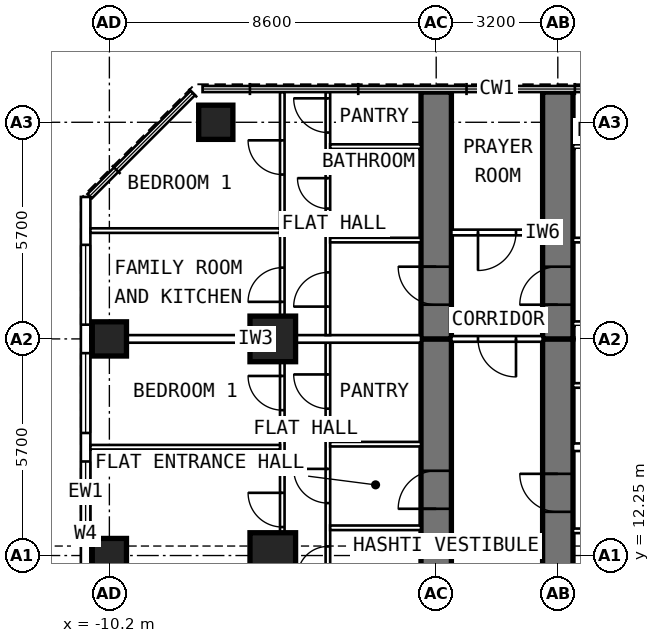
"""IFC4 building model, lengths in metres.
Left out: names, types, materials, properties, quantities, classifications, styles, units other than length and angle.
Written with IfcOpenShell. Run it as: python <this file> out.ifc"""

import sys

from ifc_helpers import new_model, si_unit, direction, frame, frame_2d, origin, origin_2d, place, context, subcontext, project, spatial, rectangle, extrude, element, fill, save


model = new_model("IFC4")
c1 = context("Model", 3, precision=1e-05, world=origin(), true_north=direction((0.0, 1.0)))
c2 = subcontext(c1, "Body", "Model", "MODEL_VIEW")
j1 = project(units=[si_unit("LENGTHUNIT", "METRE"), si_unit("PLANEANGLEUNIT", "RADIAN")], contexts=[c1])
p1 = place(None, origin())
s1 = spatial("IfcSite", under=j1, at=p1, CompositionType="ELEMENT")
p2 = place(p1, origin())
s2 = spatial("IfcBuilding", under=s1, at=p2, CompositionType="ELEMENT")
p3 = place(p2, frame((0.0, 0.0, 145.4)))
s3 = spatial("IfcBuildingStorey", under=s2, at=p3, CompositionType="ELEMENT", Elevation=145.4)
for number, where, z_axis, x_axis in (
    (1, (-10.2, 12.25, 0.0), (0.0, 0.0, 1.0), (0.0, 1.0, 0.0)),
    (2, (-10.2, 17.95, 0.0), (0.0, 0.0, 1.0), (0.0, 1.0, 0.0)),
    (3, (-7.4, 23.65, 0.0), (0.0, 0.0, 1.0), (0.0, 1.0, 0.0)),
):
    element("IfcColumn", number, at=place(p3, frame(where, z_axis=z_axis, x_axis=x_axis)), inside=s3, PredefinedType="COLUMN", context=c2, shape_type="SweptSolid", body=[
        extrude(rectangle(XDim=0.9, YDim=0.9, at=origin_2d()), origin(), (0.0, 0.0, 1.0), 3.6),
    ])
for number, where, z_axis, x_axis in (
    (4, (-5.9, 12.25, 0.0), (0.0, 0.0, 1.0), (0.0, 1.0, 0.0)),
    (5, (-5.9, 17.95, 0.0), (0.0, 0.0, 1.0), (0.0, 1.0, 0.0)),
):
    element("IfcColumn", number, at=place(p3, frame(where, z_axis=z_axis, x_axis=x_axis)), inside=s3, PredefinedType="COLUMN", context=c2, shape_type="SweptSolid", body=[
        extrude(rectangle(XDim=1.2, YDim=1.2, at=origin_2d()), origin(), (0.0, 0.0, 1.0), 3.6),
    ])
p4 = place(p3, frame((-1.6, 9.6, 0.0), z_axis=(0.0, 0.0, 1.0), x_axis=(0.0, 1.0, 0.0)))
e6 = element("IfcWall", 6, at=p4, inside=s3, PredefinedType="SHEAR", context=c2, shape_type="SweptSolid", body=[
    extrude(rectangle(XDim=8.35, YDim=0.8, at=frame_2d((4.175, 0.0))), origin(), (0.0, 0.0, 1.0), 3.6),
])
p5 = place(p4, frame((3.88, 0.0, 0.0)))
e7 = element("IfcOpeningElement", 7, at=p5, cuts=e6, PredefinedType="OPENING", context=c2, shape_type="SweptSolid", body=[
    extrude(rectangle(XDim=1.0, YDim=2.1, at=frame_2d((0.5, 1.05))), frame((0.0, 0.412, 0.0), z_axis=(0.0, -1.0, 0.0), x_axis=(1.0, 0.0, 0.0)), (0.0, 0.0, 1.0), 0.824),
])
p6 = place(p3, frame((-1.6, 17.95, 0.0), z_axis=(0.0, 0.0, 1.0), x_axis=(0.0, 1.0, 0.0)))
e8 = element("IfcWall", 8, at=p6, inside=s3, PredefinedType="SHEAR", context=c2, shape_type="SweptSolid", body=[
    extrude(rectangle(XDim=6.495, YDim=0.8, at=frame_2d((3.248, 0.0))), origin(), (0.0, 0.0, 1.0), 3.6),
])
p7 = place(p6, frame((0.9, 0.0, 0.0)))
e9 = element("IfcOpeningElement", 9, at=p7, cuts=e8, PredefinedType="OPENING", context=c2, shape_type="SweptSolid", body=[
    extrude(rectangle(XDim=1.0, YDim=2.1, at=frame_2d((0.5, 1.05))), frame((0.0, 0.412, 0.0), z_axis=(0.0, -1.0, 0.0), x_axis=(1.0, 0.0, 0.0)), (0.0, 0.0, 1.0), 0.824),
])
p8 = place(p3, frame((1.6, 9.6, 0.0), z_axis=(0.0, 0.0, 1.0), x_axis=(0.0, 1.0, 0.0)))
e10 = element("IfcWall", 10, at=p8, inside=s3, PredefinedType="SHEAR", context=c2, shape_type="SweptSolid", body=[
    extrude(rectangle(XDim=8.35, YDim=0.8, at=frame_2d((4.175, 0.0))), origin(), (0.0, 0.0, 1.0), 3.6),
])
p9 = place(p8, frame((3.8, 0.0, 0.0)))
e11 = element("IfcOpeningElement", 11, at=p9, cuts=e10, PredefinedType="OPENING", context=c2, shape_type="SweptSolid", body=[
    extrude(rectangle(XDim=1.0, YDim=2.1, at=frame_2d((0.5, 1.05))), frame((0.0, 0.412, 0.0), z_axis=(0.0, -1.0, 0.0), x_axis=(1.0, 0.0, 0.0)), (0.0, 0.0, 1.0), 0.824),
])
p10 = place(p3, frame((1.6, 17.95, 0.0), z_axis=(0.0, 0.0, 1.0), x_axis=(0.0, 1.0, 0.0)))
e12 = element("IfcWall", 12, at=p10, inside=s3, PredefinedType="SHEAR", context=c2, shape_type="SweptSolid", body=[
    extrude(rectangle(XDim=6.495, YDim=0.8, at=frame_2d((3.248, 0.0))), origin(), (0.0, 0.0, 1.0), 3.6),
])
p11 = place(p10, frame((0.9, 0.0, 0.0)))
e13 = element("IfcOpeningElement", 13, at=p11, cuts=e12, PredefinedType="OPENING", context=c2, shape_type="SweptSolid", body=[
    extrude(rectangle(XDim=1.0, YDim=2.1, at=frame_2d((0.5, 1.05))), frame((0.0, 0.412, 0.0), z_axis=(0.0, -1.0, 0.0), x_axis=(1.0, 0.0, 0.0)), (0.0, 0.0, 1.0), 0.824),
])
p12 = place(p3, frame((-10.825, 6.148, 0.0), z_axis=(0.0, 0.0, 1.0), x_axis=(0.0, 1.0, 0.0)))
e14 = element("IfcWall", 14, at=p12, inside=s3, PredefinedType="SOLIDWALL", context=c2, shape_type="SweptSolid", body=[
    extrude(rectangle(XDim=15.537, YDim=0.25, at=frame_2d((7.769, 0.0))), origin(), (0.0, 0.0, 1.0), 3.35),
])
p13 = place(p12, frame((0.777, 0.0, 0.8)))
e15 = element("IfcOpeningElement", 15, at=p13, cuts=e14, PredefinedType="OPENING", context=c2, shape_type="SweptSolid", body=[
    extrude(rectangle(XDim=2.1, YDim=1.8, at=frame_2d((1.05, 0.9))), frame((0.0, 0.137, 0.0), z_axis=(0.0, -1.0, 0.0), x_axis=(1.0, 0.0, 0.0)), (0.0, 0.0, 1.0), 0.274),
])
p14 = place(p12, frame((3.627, 0.0, 0.8)))
e16 = element("IfcOpeningElement", 16, at=p14, cuts=e14, PredefinedType="OPENING", context=c2, shape_type="SweptSolid", body=[
    extrude(rectangle(XDim=2.1, YDim=1.8, at=frame_2d((1.05, 0.9))), frame((0.0, 0.137, 0.0), z_axis=(0.0, -1.0, 0.0), x_axis=(1.0, 0.0, 0.0)), (0.0, 0.0, 1.0), 0.274),
])
p15 = place(p12, frame((6.477, 0.0, 0.8)))
e17 = element("IfcOpeningElement", 17, at=p15, cuts=e14, PredefinedType="OPENING", context=c2, shape_type="SweptSolid", body=[
    extrude(rectangle(XDim=2.1, YDim=1.8, at=frame_2d((1.05, 0.9))), frame((0.0, 0.137, 0.0), z_axis=(0.0, -1.0, 0.0), x_axis=(1.0, 0.0, 0.0)), (0.0, 0.0, 1.0), 0.274),
])
p16 = place(p12, frame((9.327, 0.0, 0.8)))
e18 = element("IfcOpeningElement", 18, at=p16, cuts=e14, PredefinedType="OPENING", context=c2, shape_type="SweptSolid", body=[
    extrude(rectangle(XDim=2.1, YDim=1.8, at=frame_2d((1.05, 0.9))), frame((0.0, 0.137, 0.0), z_axis=(0.0, -1.0, 0.0), x_axis=(1.0, 0.0, 0.0)), (0.0, 0.0, 1.0), 0.274),
])
p17 = place(p12, frame((12.177, 0.0, 0.8)))
e19 = element("IfcOpeningElement", 19, at=p17, cuts=e14, PredefinedType="OPENING", context=c2, shape_type="SweptSolid", body=[
    extrude(rectangle(XDim=2.1, YDim=1.8, at=frame_2d((1.05, 0.9))), frame((0.0, 0.137, 0.0), z_axis=(0.0, -1.0, 0.0), x_axis=(1.0, 0.0, 0.0)), (0.0, 0.0, 1.0), 0.274),
])
p18 = place(p3, frame((-4.45, 10.05, 0.0), z_axis=(0.0, 0.0, 1.0), x_axis=(0.0, 1.0, 0.0)))
e20 = element("IfcWall", 20, at=p18, inside=s3, PredefinedType="PARTITIONING", context=c2, shape_type="SweptSolid", body=[
    extrude(rectangle(XDim=7.8, YDim=0.12, at=frame_2d((3.9, 0.0))), origin(), (0.0, 0.0, 1.0), 3.35),
])
p19 = place(p18, frame((1.64, 0.0, 0.0)))
e21 = element("IfcOpeningElement", 21, at=p19, cuts=e20, PredefinedType="OPENING", context=c2, shape_type="SweptSolid", body=[
    extrude(rectangle(XDim=0.8, YDim=2.1, at=frame_2d((0.4, 1.05))), frame((0.0, 0.072, 0.0), z_axis=(0.0, -1.0, 0.0), x_axis=(1.0, 0.0, 0.0)), (0.0, 0.0, 1.0), 0.144),
])
p20 = place(p18, frame((3.58, 0.0, 0.0)))
e22 = element("IfcOpeningElement", 22, at=p20, cuts=e20, PredefinedType="OPENING", context=c2, shape_type="SweptSolid", body=[
    extrude(rectangle(XDim=0.9, YDim=2.1, at=frame_2d((0.45, 1.05))), frame((0.0, 0.072, 0.0), z_axis=(0.0, -1.0, 0.0), x_axis=(1.0, 0.0, 0.0)), (0.0, 0.0, 1.0), 0.144),
])
p21 = place(p18, frame((6.065, 0.0, 0.0)))
e23 = element("IfcOpeningElement", 23, at=p21, cuts=e20, PredefinedType="OPENING", context=c2, shape_type="SweptSolid", body=[
    extrude(rectangle(XDim=0.9, YDim=2.1, at=frame_2d((0.45, 1.05))), frame((0.0, 0.072, 0.0), z_axis=(0.0, -1.0, 0.0), x_axis=(1.0, 0.0, 0.0)), (0.0, 0.0, 1.0), 0.144),
])
p22 = place(p3, frame((-5.65, 9.6, 0.0), z_axis=(0.0, 0.0, 1.0), x_axis=(0.0, 1.0, 0.0)))
e24 = element("IfcWall", 24, at=p22, inside=s3, PredefinedType="PARTITIONING", context=c2, shape_type="SweptSolid", body=[
    extrude(rectangle(XDim=8.1, YDim=0.12, at=frame_2d((4.05, 0.0))), origin(), (0.0, 0.0, 1.0), 3.35),
])
p23 = place(p22, frame((3.4, 0.0, 0.0)))
e25 = element("IfcOpeningElement", 25, at=p23, cuts=e24, PredefinedType="OPENING", context=c2, shape_type="SweptSolid", body=[
    extrude(rectangle(XDim=0.9, YDim=2.1, at=frame_2d((0.45, 1.05))), frame((0.0, 0.072, 0.0), z_axis=(0.0, -1.0, 0.0), x_axis=(1.0, 0.0, 0.0)), (0.0, 0.0, 1.0), 0.144),
])
p24 = place(p22, frame((6.475, 0.0, 0.0)))
e26 = element("IfcOpeningElement", 26, at=p24, cuts=e24, PredefinedType="OPENING", context=c2, shape_type="SweptSolid", body=[
    extrude(rectangle(XDim=0.9, YDim=2.1, at=frame_2d((0.45, 1.05))), frame((0.0, 0.072, 0.0), z_axis=(0.0, -1.0, 0.0), x_axis=(1.0, 0.0, 0.0)), (0.0, 0.0, 1.0), 0.144),
])
p25 = place(p3, frame((-5.71, 15.1, 0.0), z_axis=(0.0, 0.0, 1.0), x_axis=(-1.0, 0.0, 0.0)))
e27 = element("IfcWall", 27, at=p25, inside=s3, PredefinedType="PARTITIONING", context=c2, shape_type="SweptSolid", body=[
    extrude(rectangle(XDim=4.99, YDim=0.12, at=frame_2d((2.495, 0.0))), origin(), (0.0, 0.0, 1.0), 3.35),
])
for number, where, z_axis, x_axis in (
    (28, (-2.0, 12.98, 0.0), (0.0, 0.0, 1.0), (-1.0, 0.0, 0.0)),
    (29, (-2.0, 15.18, 0.0), (0.0, 0.0, 1.0), (-1.0, 0.0, 0.0)),
):
    element("IfcWall", number, at=place(p3, frame(where, z_axis=z_axis, x_axis=x_axis)), inside=s3, PredefinedType="PARTITIONING", context=c2, shape_type="SweptSolid", body=[
        extrude(rectangle(XDim=2.39, YDim=0.12, at=frame_2d((1.195, 0.0))), origin(), (0.0, 0.0, 1.0), 3.35),
    ])
p26 = place(p3, frame((-4.45, 18.05, 0.0), z_axis=(0.0, 0.0, 1.0), x_axis=(0.0, 1.0, 0.0)))
e30 = element("IfcWall", 30, at=p26, inside=s3, PredefinedType="PARTITIONING", context=c2, shape_type="SweptSolid", body=[
    extrude(rectangle(XDim=6.395, YDim=0.12, at=frame_2d((3.198, 0.0))), origin(), (0.0, 0.0, 1.0), 3.35),
])
p27 = place(p26, frame((0.75, 0.0, 0.0)))
e31 = element("IfcOpeningElement", 31, at=p27, cuts=e30, PredefinedType="OPENING", context=c2, shape_type="SweptSolid", body=[
    extrude(rectangle(XDim=0.9, YDim=2.1, at=frame_2d((0.45, 1.05))), frame((0.0, 0.072, 0.0), z_axis=(0.0, -1.0, 0.0), x_axis=(1.0, 0.0, 0.0)), (0.0, 0.0, 1.0), 0.144),
])
p28 = place(p26, frame((3.33, 0.0, 0.0)))
e32 = element("IfcOpeningElement", 32, at=p28, cuts=e30, PredefinedType="OPENING", context=c2, shape_type="SweptSolid", body=[
    extrude(rectangle(XDim=0.8, YDim=2.1, at=frame_2d((0.4, 1.05))), frame((0.0, 0.072, 0.0), z_axis=(0.0, -1.0, 0.0), x_axis=(1.0, 0.0, 0.0)), (0.0, 0.0, 1.0), 0.144),
])
p29 = place(p26, frame((5.33, 0.0, 0.0)))
e33 = element("IfcOpeningElement", 33, at=p29, cuts=e30, PredefinedType="OPENING", context=c2, shape_type="SweptSolid", body=[
    extrude(rectangle(XDim=0.9, YDim=2.1, at=frame_2d((0.45, 1.05))), frame((0.0, 0.072, 0.0), z_axis=(0.0, -1.0, 0.0), x_axis=(1.0, 0.0, 0.0)), (0.0, 0.0, 1.0), 0.144),
])
p30 = place(p3, frame((-5.65, 18.05, 0.0), z_axis=(0.0, 0.0, 1.0), x_axis=(0.0, 1.0, 0.0)))
e34 = element("IfcWall", 34, at=p30, inside=s3, PredefinedType="PARTITIONING", context=c2, shape_type="SweptSolid", body=[
    extrude(rectangle(XDim=6.395, YDim=0.12, at=frame_2d((3.198, 0.0))), origin(), (0.0, 0.0, 1.0), 3.35),
])
p31 = place(p30, frame((0.875, 0.0, 0.0)))
e35 = element("IfcOpeningElement", 35, at=p31, cuts=e34, PredefinedType="OPENING", context=c2, shape_type="SweptSolid", body=[
    extrude(rectangle(XDim=0.9, YDim=2.1, at=frame_2d((0.45, 1.05))), frame((0.0, 0.072, 0.0), z_axis=(0.0, -1.0, 0.0), x_axis=(1.0, 0.0, 0.0)), (0.0, 0.0, 1.0), 0.144),
])
p32 = place(p30, frame((4.225, 0.0, 0.0)))
e36 = element("IfcOpeningElement", 36, at=p32, cuts=e34, PredefinedType="OPENING", context=c2, shape_type="SweptSolid", body=[
    extrude(rectangle(XDim=0.9, YDim=2.1, at=frame_2d((0.45, 1.05))), frame((0.0, 0.072, 0.0), z_axis=(0.0, -1.0, 0.0), x_axis=(1.0, 0.0, 0.0)), (0.0, 0.0, 1.0), 0.144),
])
p33 = place(p3, frame((-5.71, 20.8, 0.0), z_axis=(0.0, 0.0, 1.0), x_axis=(-1.0, 0.0, 0.0)))
e37 = element("IfcWall", 37, at=p33, inside=s3, PredefinedType="PARTITIONING", context=c2, shape_type="SweptSolid", body=[
    extrude(rectangle(XDim=4.99, YDim=0.12, at=frame_2d((2.495, 0.0))), origin(), (0.0, 0.0, 1.0), 3.35),
])
for number, where, z_axis, x_axis in (
    (38, (-2.0, 20.55, 0.0), (0.0, 0.0, 1.0), (-1.0, 0.0, 0.0)),
    (39, (-2.0, 23.01, 0.0), (0.0, 0.0, 1.0), (-1.0, 0.0, 0.0)),
):
    element("IfcWall", number, at=place(p3, frame(where, z_axis=z_axis, x_axis=x_axis)), inside=s3, PredefinedType="PARTITIONING", context=c2, shape_type="SweptSolid", body=[
        extrude(rectangle(XDim=2.39, YDim=0.12, at=frame_2d((1.195, 0.0))), origin(), (0.0, 0.0, 1.0), 3.35),
    ])
p34 = place(p3, frame((-2.0, 17.95, 0.0), z_axis=(0.0, 0.0, 1.0), x_axis=(-1.0, 0.0, 0.0)))
e40 = element("IfcWall", 40, at=p34, inside=s3, PredefinedType="PARTITIONING", context=c2, shape_type="SweptSolid", body=[
    extrude(rectangle(XDim=8.7, YDim=0.2, at=frame_2d((4.35, 0.0))), origin(), (0.0, 0.0, 1.0), 2.45),
])
for number, where, z_axis, x_axis in (
    (41, (2.0, 12.9, 0.0), (0.0, 0.0, 1.0), (1.0, 0.0, 0.0)),
    (42, (2.0, 16.725, 0.0), (0.0, 0.0, 1.0), (1.0, 0.0, 0.0)),
    (43, (2.0, 18.35, 0.0), (0.0, 0.0, 1.0), (1.0, 0.0, 0.0)),
    (44, (2.0, 20.55, 0.0), (0.0, 0.0, 1.0), (1.0, 0.0, 0.0)),
    (45, (2.0, 23.01, 0.0), (0.0, 0.0, 1.0), (1.0, 0.0, 0.0)),
):
    element("IfcWall", number, at=place(p3, frame(where, z_axis=z_axis, x_axis=x_axis)), inside=s3, PredefinedType="PARTITIONING", context=c2, shape_type="SweptSolid", body=[
        extrude(rectangle(XDim=2.39, YDim=0.12, at=frame_2d((1.195, 0.0))), origin(), (0.0, 0.0, 1.0), 3.35),
    ])
p35 = place(p3, frame((2.0, 15.1, 0.0), z_axis=(0.0, 0.0, 1.0), x_axis=(1.0, 0.0, 0.0)))
e46 = element("IfcWall", 46, at=p35, inside=s3, PredefinedType="PARTITIONING", context=c2, shape_type="SweptSolid", body=[
    extrude(rectangle(XDim=8.7, YDim=0.2, at=frame_2d((4.35, 0.0))), origin(), (0.0, 0.0, 1.0), 3.35),
])
p36 = place(p3, frame((1.2, 20.75, 0.0), z_axis=(0.0, 0.0, 1.0), x_axis=(-1.0, 0.0, 0.0)))
e47 = element("IfcWall", 47, at=p36, inside=s3, PredefinedType="PARTITIONING", context=c2, shape_type="SweptSolid", body=[
    extrude(rectangle(XDim=2.4, YDim=0.15, at=frame_2d((1.2, 0.0))), origin(), (0.0, 0.0, 1.0), 3.35),
])
p37 = place(p36, frame((0.7, 0.0, 0.0)))
e48 = element("IfcOpeningElement", 48, at=p37, cuts=e47, PredefinedType="OPENING", context=c2, shape_type="SweptSolid", body=[
    extrude(rectangle(XDim=1.0, YDim=2.1, at=frame_2d((0.5, 1.05))), frame((0.0, 0.087, 0.0), z_axis=(0.0, -1.0, 0.0), x_axis=(1.0, 0.0, 0.0)), (0.0, 0.0, 1.0), 0.174),
])
p38 = place(p3, frame((1.2, 17.95, 0.0), z_axis=(0.0, 0.0, 1.0), x_axis=(-1.0, 0.0, 0.0)))
e49 = element("IfcWall", 49, at=p38, inside=s3, PredefinedType="PARTITIONING", context=c2, shape_type="SweptSolid", body=[
    extrude(rectangle(XDim=2.4, YDim=0.15, at=frame_2d((1.2, 0.0))), origin(), (0.0, 0.0, 1.0), 3.35),
])
p39 = place(p38, frame((0.7, 0.0, 0.0)))
e50 = element("IfcOpeningElement", 50, at=p39, cuts=e49, PredefinedType="OPENING", context=c2, shape_type="SweptSolid", body=[
    extrude(rectangle(XDim=1.0, YDim=2.1, at=frame_2d((0.5, 1.05))), frame((0.0, 0.087, 0.0), z_axis=(0.0, -1.0, 0.0), x_axis=(1.0, 0.0, 0.0)), (0.0, 0.0, 1.0), 0.174),
])
p40 = place(p15, origin())
e51 = element("IfcWindow", 51, at=p40, inside=s3, PartitioningType="SINGLE_PANEL", PredefinedType="WINDOW", context=c2, shape_type="SweptSolid", body=[
    extrude(rectangle(XDim=2.1, YDim=1.8, at=frame_2d((1.05, 0.9))), frame((0.0, 0.03, 0.0), z_axis=(0.0, -1.0, 0.0), x_axis=(1.0, 0.0, 0.0)), (0.0, 0.0, 1.0), 0.06),
])
fill(e17, e51)
p41 = place(p16, origin())
e52 = element("IfcWindow", 52, at=p41, inside=s3, PartitioningType="SINGLE_PANEL", PredefinedType="WINDOW", context=c2, shape_type="SweptSolid", body=[
    extrude(rectangle(XDim=2.1, YDim=1.8, at=frame_2d((1.05, 0.9))), frame((0.0, 0.03, 0.0), z_axis=(0.0, -1.0, 0.0), x_axis=(1.0, 0.0, 0.0)), (0.0, 0.0, 1.0), 0.06),
])
fill(e18, e52)
p42 = place(p17, origin())
e53 = element("IfcWindow", 53, at=p42, inside=s3, PartitioningType="SINGLE_PANEL", PredefinedType="WINDOW", context=c2, shape_type="SweptSolid", body=[
    extrude(rectangle(XDim=2.1, YDim=1.8, at=frame_2d((1.05, 0.9))), frame((0.0, 0.03, 0.0), z_axis=(0.0, -1.0, 0.0), x_axis=(1.0, 0.0, 0.0)), (0.0, 0.0, 1.0), 0.06),
])
fill(e19, e53)
p43 = place(p5, origin())
e54 = element("IfcDoor", 54, at=p43, inside=s3, OperationType="SINGLE_SWING_LEFT", PredefinedType="DOOR", context=c2, shape_type="SweptSolid", body=[
    extrude(rectangle(XDim=1.0, YDim=2.1, at=frame_2d((0.5, 1.05))), frame((0.0, 0.15, 0.0), z_axis=(0.0, -1.0, 0.0), x_axis=(1.0, 0.0, 0.0)), (0.0, 0.0, 1.0), 0.3),
])
fill(e7, e54)
p44 = place(p23, origin())
e55 = element("IfcDoor", 55, at=p44, inside=s3, OperationType="SINGLE_SWING_RIGHT", PredefinedType="DOOR", context=c2, shape_type="SweptSolid", body=[
    extrude(rectangle(XDim=0.9, YDim=2.1, at=frame_2d((0.45, 1.05))), frame((0.0, 0.025, 0.0), z_axis=(0.0, -1.0, 0.0), x_axis=(1.0, 0.0, 0.0)), (0.0, 0.0, 1.0), 0.05),
])
fill(e25, e55)
p45 = place(p24, origin())
e56 = element("IfcDoor", 56, at=p45, inside=s3, OperationType="SINGLE_SWING_RIGHT", PredefinedType="DOOR", context=c2, shape_type="SweptSolid", body=[
    extrude(rectangle(XDim=0.9, YDim=2.1, at=frame_2d((0.45, 1.05))), frame((0.0, 0.025, 0.0), z_axis=(0.0, -1.0, 0.0), x_axis=(1.0, 0.0, 0.0)), (0.0, 0.0, 1.0), 0.05),
])
fill(e26, e56)
p46 = place(p19, origin())
e57 = element("IfcDoor", 57, at=p46, inside=s3, OperationType="SINGLE_SWING_LEFT", PredefinedType="DOOR", context=c2, shape_type="SweptSolid", body=[
    extrude(rectangle(XDim=0.8, YDim=2.1, at=frame_2d((0.4, 1.05))), frame((0.0, 0.025, 0.0), z_axis=(0.0, -1.0, 0.0), x_axis=(1.0, 0.0, 0.0)), (0.0, 0.0, 1.0), 0.05),
])
fill(e21, e57)
p47 = place(p20, origin())
e58 = element("IfcDoor", 58, at=p47, inside=s3, OperationType="SINGLE_SWING_RIGHT", PredefinedType="DOOR", context=c2, shape_type="SweptSolid", body=[
    extrude(rectangle(XDim=0.9, YDim=2.1, at=frame_2d((0.45, 1.05))), frame((0.0, 0.025, 0.0), z_axis=(0.0, -1.0, 0.0), x_axis=(1.0, 0.0, 0.0)), (0.0, 0.0, 1.0), 0.05),
])
fill(e22, e58)
p48 = place(p21, origin())
e59 = element("IfcDoor", 59, at=p48, inside=s3, OperationType="SINGLE_SWING_RIGHT", PredefinedType="DOOR", context=c2, shape_type="SweptSolid", body=[
    extrude(rectangle(XDim=0.9, YDim=2.1, at=frame_2d((0.45, 1.05))), frame((0.0, 0.025, 0.0), z_axis=(0.0, -1.0, 0.0), x_axis=(1.0, 0.0, 0.0)), (0.0, 0.0, 1.0), 0.05),
])
fill(e23, e59)
p49 = place(p7, origin())
e60 = element("IfcDoor", 60, at=p49, inside=s3, OperationType="SINGLE_SWING_RIGHT", PredefinedType="DOOR", context=c2, shape_type="SweptSolid", body=[
    extrude(rectangle(XDim=1.0, YDim=2.1, at=frame_2d((0.5, 1.05))), frame((0.0, 0.15, 0.0), z_axis=(0.0, -1.0, 0.0), x_axis=(1.0, 0.0, 0.0)), (0.0, 0.0, 1.0), 0.3),
])
fill(e9, e60)
p50 = place(p31, origin())
e61 = element("IfcDoor", 61, at=p50, inside=s3, OperationType="SINGLE_SWING_LEFT", PredefinedType="DOOR", context=c2, shape_type="SweptSolid", body=[
    extrude(rectangle(XDim=0.9, YDim=2.1, at=frame_2d((0.45, 1.05))), frame((0.0, 0.025, 0.0), z_axis=(0.0, -1.0, 0.0), x_axis=(1.0, 0.0, 0.0)), (0.0, 0.0, 1.0), 0.05),
])
fill(e35, e61)
p51 = place(p32, origin())
e62 = element("IfcDoor", 62, at=p51, inside=s3, OperationType="SINGLE_SWING_RIGHT", PredefinedType="DOOR", context=c2, shape_type="SweptSolid", body=[
    extrude(rectangle(XDim=0.9, YDim=2.1, at=frame_2d((0.45, 1.05))), frame((0.0, 0.025, 0.0), z_axis=(0.0, -1.0, 0.0), x_axis=(1.0, 0.0, 0.0)), (0.0, 0.0, 1.0), 0.05),
])
fill(e36, e62)
p52 = place(p27, origin())
e63 = element("IfcDoor", 63, at=p52, inside=s3, OperationType="SINGLE_SWING_LEFT", PredefinedType="DOOR", context=c2, shape_type="SweptSolid", body=[
    extrude(rectangle(XDim=0.9, YDim=2.1, at=frame_2d((0.45, 1.05))), frame((0.0, 0.025, 0.0), z_axis=(0.0, -1.0, 0.0), x_axis=(1.0, 0.0, 0.0)), (0.0, 0.0, 1.0), 0.05),
])
fill(e31, e63)
p53 = place(p28, origin())
e64 = element("IfcDoor", 64, at=p53, inside=s3, OperationType="SINGLE_SWING_RIGHT", PredefinedType="DOOR", context=c2, shape_type="SweptSolid", body=[
    extrude(rectangle(XDim=0.8, YDim=2.1, at=frame_2d((0.4, 1.05))), frame((0.0, 0.025, 0.0), z_axis=(0.0, -1.0, 0.0), x_axis=(1.0, 0.0, 0.0)), (0.0, 0.0, 1.0), 0.05),
])
fill(e32, e64)
p54 = place(p29, origin())
e65 = element("IfcDoor", 65, at=p54, inside=s3, OperationType="SINGLE_SWING_RIGHT", PredefinedType="DOOR", context=c2, shape_type="SweptSolid", body=[
    extrude(rectangle(XDim=0.9, YDim=2.1, at=frame_2d((0.45, 1.05))), frame((0.0, 0.025, 0.0), z_axis=(0.0, -1.0, 0.0), x_axis=(1.0, 0.0, 0.0)), (0.0, 0.0, 1.0), 0.05),
])
fill(e33, e65)
p55 = place(p9, origin())
e66 = element("IfcDoor", 66, at=p55, inside=s3, OperationType="SINGLE_SWING_RIGHT", PredefinedType="DOOR", context=c2, shape_type="SweptSolid", body=[
    extrude(rectangle(XDim=1.0, YDim=2.1, at=frame_2d((0.5, 1.05))), frame((0.0, 0.15, 0.0), z_axis=(0.0, -1.0, 0.0), x_axis=(1.0, 0.0, 0.0)), (0.0, 0.0, 1.0), 0.3),
])
fill(e11, e66)
p56 = place(p11, origin())
e67 = element("IfcDoor", 67, at=p56, inside=s3, OperationType="SINGLE_SWING_LEFT", PredefinedType="DOOR", context=c2, shape_type="SweptSolid", body=[
    extrude(rectangle(XDim=1.0, YDim=2.1, at=frame_2d((0.5, 1.05))), frame((0.0, 0.15, 0.0), z_axis=(0.0, -1.0, 0.0), x_axis=(1.0, 0.0, 0.0)), (0.0, 0.0, 1.0), 0.3),
])
fill(e13, e67)
p57 = place(p37, origin())
e68 = element("IfcDoor", 68, at=p57, inside=s3, OperationType="SINGLE_SWING_RIGHT", PredefinedType="DOOR", context=c2, shape_type="SweptSolid", body=[
    extrude(rectangle(XDim=1.0, YDim=2.1, at=frame_2d((0.5, 1.05))), frame((0.0, 0.025, 0.0), z_axis=(0.0, -1.0, 0.0), x_axis=(1.0, 0.0, 0.0)), (0.0, 0.0, 1.0), 0.05),
])
fill(e48, e68)
p58 = place(p39, origin())
e69 = element("IfcDoor", 69, at=p58, inside=s3, OperationType="SINGLE_SWING_LEFT", PredefinedType="DOOR", context=c2, shape_type="SweptSolid", body=[
    extrude(rectangle(XDim=1.0, YDim=2.1, at=frame_2d((0.5, 1.05))), frame((0.0, 0.025, 0.0), z_axis=(0.0, -1.0, 0.0), x_axis=(1.0, 0.0, 0.0)), (0.0, 0.0, 1.0), 0.05),
])
fill(e50, e69)
save(model, sys.argv[1])
